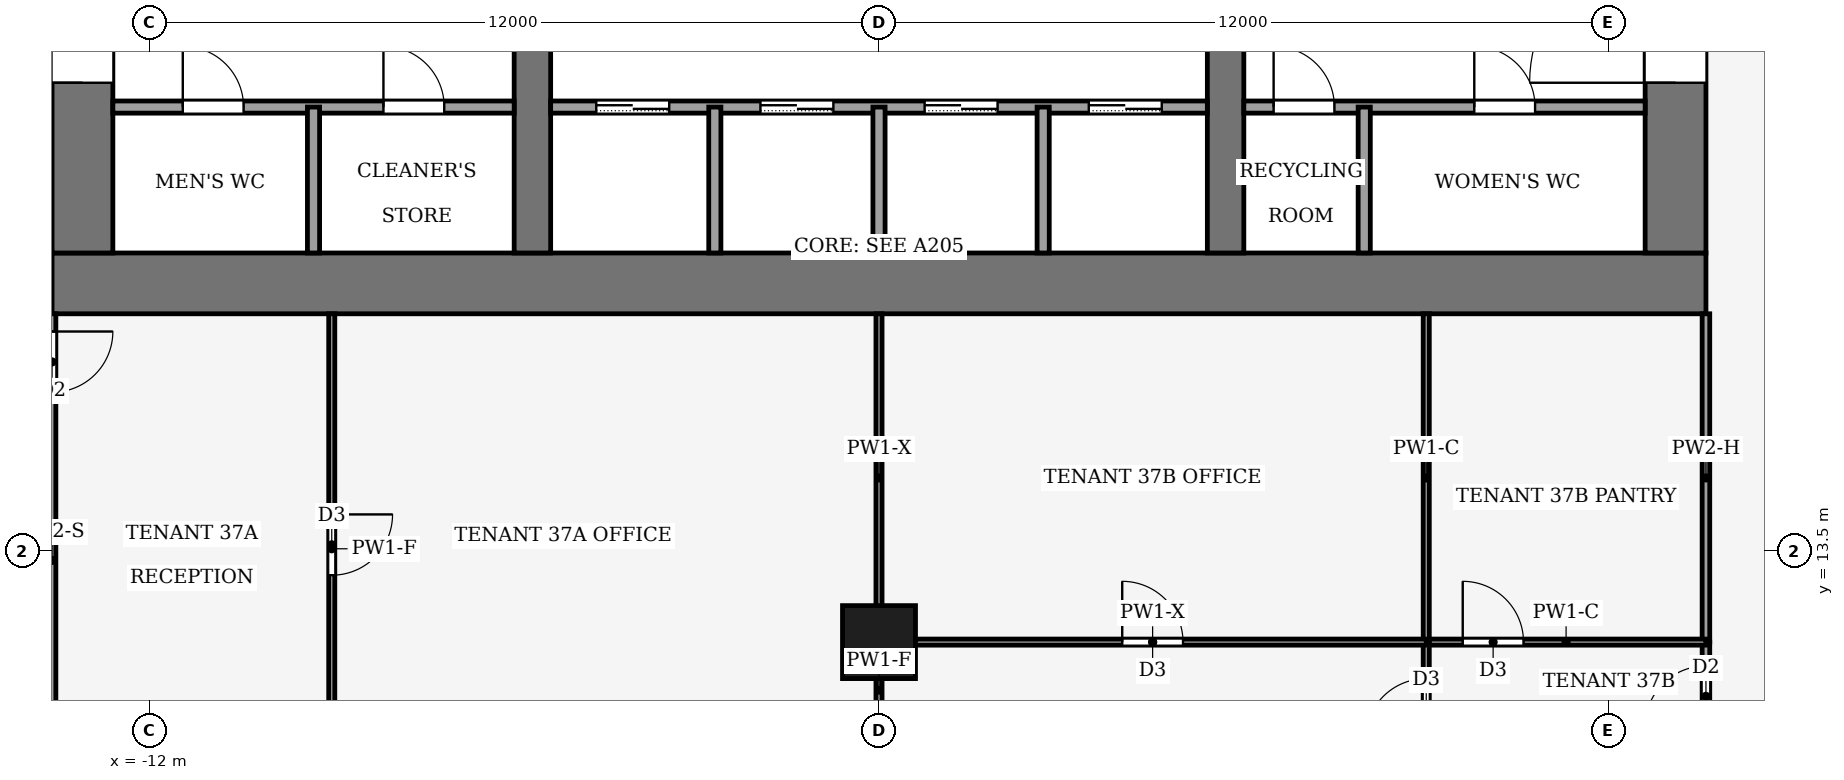
"""IFC4 building model, lengths in metres.
Left out: names, types, materials, properties, quantities, classifications, styles, units other than length and angle.
Written with IfcOpenShell. Run it as: python <this file> out.ifc"""

import sys

from ifc_helpers import new_model, si_unit, direction, frame, frame_2d, origin, origin_2d, place, context, subcontext, project, spatial, rectangle, hollow_rectangle, extrude, element, fill, save


model = new_model("IFC4")
c1 = context("Model", 3, precision=1e-05, world=origin(), true_north=direction((0.0, 1.0)))
c2 = subcontext(c1, "Body", "Model", "MODEL_VIEW")
j1 = project(units=[si_unit("LENGTHUNIT", "METRE"), si_unit("PLANEANGLEUNIT", "RADIAN")], contexts=[c1])
p1 = place(None, origin())
s1 = spatial("IfcSite", under=j1, at=p1, CompositionType="ELEMENT")
p2 = place(p1, origin())
s2 = spatial("IfcBuilding", under=s1, at=p2, CompositionType="ELEMENT")
p3 = place(p2, frame((0.0, 0.0, 162.0)))
s3 = spatial("IfcBuildingStorey", under=s2, at=p3, CompositionType="ELEMENT", Elevation=162.0)
p4 = place(p3, frame((-13.6, 17.9, -0.13), z_axis=(0.0, 0.0, 1.0), x_axis=(1.0, 0.0, 0.0)))
e1 = element("IfcWall", 1, at=p4, inside=s3, PredefinedType="SHEAR", context=c2, shape_type="SweptSolid", body=[
    extrude(rectangle(XDim=27.2, YDim=1.0, at=frame_2d((13.6, 0.0))), origin(), (0.0, 0.0, 1.0), 4.0),
])
p5 = place(p3, frame((-13.1, 18.4, -0.13), z_axis=(0.0, 0.0, 1.0), x_axis=(0.0, 1.0, 0.0)))
e2 = element("IfcWall", 2, at=p5, inside=s3, PredefinedType="SHEAR", context=c2, shape_type="SweptSolid", body=[
    extrude(rectangle(XDim=19.2, YDim=1.0, at=frame_2d((9.6, 0.0))), origin(), (0.0, 0.0, 1.0), 4.0),
])
p6 = place(p5, frame((2.8, 0.0, 0.13)))
e3 = element("IfcOpeningElement", 3, at=p6, cuts=e2, PredefinedType="OPENING", context=c2, shape_type="SweptSolid", body=[
    extrude(rectangle(XDim=2.4, YDim=2.4, at=frame_2d((1.2, 1.2))), frame((0.0, 0.51, 0.0), z_axis=(0.0, -1.0, 0.0), x_axis=(1.0, 0.0, 0.0)), (0.0, 0.0, 1.0), 1.02),
])
p7 = place(p5, frame((13.4, 0.0, 0.13)))
e4 = element("IfcOpeningElement", 4, at=p7, cuts=e2, PredefinedType="OPENING", context=c2, shape_type="SweptSolid", body=[
    extrude(rectangle(XDim=1.4, YDim=2.2, at=frame_2d((0.7, 1.1))), frame((0.0, 0.51, 0.0), z_axis=(0.0, -1.0, 0.0), x_axis=(1.0, 0.0, 0.0)), (0.0, 0.0, 1.0), 1.02),
])
p8 = place(p3, frame((13.1, 18.4, -0.13), z_axis=(0.0, 0.0, 1.0), x_axis=(0.0, 1.0, 0.0)))
e5 = element("IfcWall", 5, at=p8, inside=s3, PredefinedType="SHEAR", context=c2, shape_type="SweptSolid", body=[
    extrude(rectangle(XDim=19.2, YDim=1.0, at=frame_2d((9.6, 0.0))), origin(), (0.0, 0.0, 1.0), 4.0),
])
p9 = place(p8, frame((2.8, 0.0, 0.13)))
e6 = element("IfcOpeningElement", 6, at=p9, cuts=e5, PredefinedType="OPENING", context=c2, shape_type="SweptSolid", body=[
    extrude(rectangle(XDim=2.4, YDim=2.4, at=frame_2d((1.2, 1.2))), frame((0.0, 0.51, 0.0), z_axis=(0.0, -1.0, 0.0), x_axis=(1.0, 0.0, 0.0)), (0.0, 0.0, 1.0), 1.02),
])
p10 = place(p8, frame((13.3, 0.0, 0.13)))
e7 = element("IfcOpeningElement", 7, at=p10, cuts=e5, PredefinedType="OPENING", context=c2, shape_type="SweptSolid", body=[
    extrude(rectangle(XDim=2.4, YDim=2.4, at=frame_2d((1.2, 1.2))), frame((0.0, 0.51, 0.0), z_axis=(0.0, -1.0, 0.0), x_axis=(1.0, 0.0, 0.0)), (0.0, 0.0, 1.0), 1.02),
])
p11 = place(p3, frame((-5.7, 18.4, -0.13), z_axis=(0.0, 0.0, 1.0), x_axis=(0.0, 1.0, 0.0)))
e8 = element("IfcWall", 8, at=p11, inside=s3, PredefinedType="SHEAR", context=c2, shape_type="SweptSolid", body=[
    extrude(rectangle(XDim=19.2, YDim=0.6, at=frame_2d((9.6, 0.0))), origin(), (0.0, 0.0, 1.0), 4.0),
])
p12 = place(p11, frame((8.35, 0.0, 0.13)))
e9 = element("IfcOpeningElement", 9, at=p12, cuts=e8, PredefinedType="OPENING", context=c2, shape_type="SweptSolid", body=[
    extrude(rectangle(XDim=0.9, YDim=2.1, at=frame_2d((0.45, 1.05))), frame((0.0, 0.31, 0.0), z_axis=(0.0, -1.0, 0.0), x_axis=(1.0, 0.0, 0.0)), (0.0, 0.0, 1.0), 0.62),
])
p13 = place(p3, frame((5.7, 18.4, -0.13), z_axis=(0.0, 0.0, 1.0), x_axis=(0.0, 1.0, 0.0)))
e10 = element("IfcWall", 10, at=p13, inside=s3, PredefinedType="SHEAR", context=c2, shape_type="SweptSolid", body=[
    extrude(rectangle(XDim=19.2, YDim=0.6, at=frame_2d((9.6, 0.0))), origin(), (0.0, 0.0, 1.0), 4.0),
])
p14 = place(p13, frame((8.35, 0.0, 0.13)))
e11 = element("IfcOpeningElement", 11, at=p14, cuts=e10, PredefinedType="OPENING", context=c2, shape_type="SweptSolid", body=[
    extrude(rectangle(XDim=0.9, YDim=2.1, at=frame_2d((0.45, 1.05))), frame((0.0, 0.31, 0.0), z_axis=(0.0, -1.0, 0.0), x_axis=(1.0, 0.0, 0.0)), (0.0, 0.0, 1.0), 0.62),
])
p15 = place(p13, frame((13.3, 0.0, 0.13)))
e12 = element("IfcOpeningElement", 12, at=p15, cuts=e10, PredefinedType="OPENING", context=c2, shape_type="SweptSolid", body=[
    extrude(rectangle(XDim=2.4, YDim=2.4, at=frame_2d((1.2, 1.2))), frame((0.0, 0.31, 0.0), z_axis=(0.0, -1.0, 0.0), x_axis=(1.0, 0.0, 0.0)), (0.0, 0.0, 1.0), 0.62),
])
p16 = place(p3, frame((0.0, 12.0, 0.0), z_axis=(0.0, 0.0, 1.0), x_axis=(1.0, 0.0, 0.0)))
e13 = element("IfcColumn", 13, at=p16, inside=s3, PredefinedType="COLUMN", context=c2, shape_type="SweptSolid", body=[
    extrude(hollow_rectangle(XDim=1.2, YDim=1.2, WallThickness=0.07, at=origin_2d()), origin(), (0.0, 0.0, 1.0), 4.0),
])
p17 = place(p3, frame((-12.6, 20.8, 0.0), z_axis=(0.0, 0.0, 1.0), x_axis=(1.0, 0.0, 0.0)))
e14 = element("IfcWall", 14, at=p17, inside=s3, PredefinedType="PARTITIONING", context=c2, shape_type="SweptSolid", body=[
    extrude(rectangle(XDim=6.6, YDim=0.2, at=frame_2d((3.3, 0.0))), origin(), (0.0, 0.0, 1.0), 3.87),
])
p18 = place(p17, frame((1.15, 0.0, 0.0)))
e15 = element("IfcOpeningElement", 15, at=p18, cuts=e14, PredefinedType="OPENING", context=c2, shape_type="SweptSolid", body=[
    extrude(rectangle(XDim=1.0, YDim=2.1, at=frame_2d((0.5, 1.05))), frame((0.0, 0.11, 0.0), z_axis=(0.0, -1.0, 0.0), x_axis=(1.0, 0.0, 0.0)), (0.0, 0.0, 1.0), 0.22),
])
p19 = place(p17, frame((4.45, 0.0, 0.0)))
e16 = element("IfcOpeningElement", 16, at=p19, cuts=e14, PredefinedType="OPENING", context=c2, shape_type="SweptSolid", body=[
    extrude(rectangle(XDim=1.0, YDim=2.1, at=frame_2d((0.5, 1.05))), frame((0.0, 0.11, 0.0), z_axis=(0.0, -1.0, 0.0), x_axis=(1.0, 0.0, 0.0)), (0.0, 0.0, 1.0), 0.22),
])
p20 = place(p3, frame((-5.4, 20.8, 0.0), z_axis=(0.0, 0.0, 1.0), x_axis=(1.0, 0.0, 0.0)))
e17 = element("IfcWall", 17, at=p20, inside=s3, PredefinedType="PARTITIONING", context=c2, shape_type="SweptSolid", body=[
    extrude(rectangle(XDim=10.8, YDim=0.2, at=frame_2d((5.4, 0.0))), origin(), (0.0, 0.0, 1.0), 3.87),
])
p21 = place(p20, frame((0.75, 0.0, 0.0)))
e18 = element("IfcOpeningElement", 18, at=p21, cuts=e17, PredefinedType="OPENING", context=c2, shape_type="SweptSolid", body=[
    extrude(rectangle(XDim=1.2, YDim=2.2, at=frame_2d((0.6, 1.1))), frame((0.0, 0.11, 0.0), z_axis=(0.0, -1.0, 0.0), x_axis=(1.0, 0.0, 0.0)), (0.0, 0.0, 1.0), 0.22),
])
p22 = place(p20, frame((3.45, 0.0, 0.0)))
e19 = element("IfcOpeningElement", 19, at=p22, cuts=e17, PredefinedType="OPENING", context=c2, shape_type="SweptSolid", body=[
    extrude(rectangle(XDim=1.2, YDim=2.2, at=frame_2d((0.6, 1.1))), frame((0.0, 0.11, 0.0), z_axis=(0.0, -1.0, 0.0), x_axis=(1.0, 0.0, 0.0)), (0.0, 0.0, 1.0), 0.22),
])
p23 = place(p20, frame((6.15, 0.0, 0.0)))
e20 = element("IfcOpeningElement", 20, at=p23, cuts=e17, PredefinedType="OPENING", context=c2, shape_type="SweptSolid", body=[
    extrude(rectangle(XDim=1.2, YDim=2.2, at=frame_2d((0.6, 1.1))), frame((0.0, 0.11, 0.0), z_axis=(0.0, -1.0, 0.0), x_axis=(1.0, 0.0, 0.0)), (0.0, 0.0, 1.0), 0.22),
])
p24 = place(p20, frame((8.85, 0.0, 0.0)))
e21 = element("IfcOpeningElement", 21, at=p24, cuts=e17, PredefinedType="OPENING", context=c2, shape_type="SweptSolid", body=[
    extrude(rectangle(XDim=1.2, YDim=2.2, at=frame_2d((0.6, 1.1))), frame((0.0, 0.11, 0.0), z_axis=(0.0, -1.0, 0.0), x_axis=(1.0, 0.0, 0.0)), (0.0, 0.0, 1.0), 0.22),
])
p25 = place(p3, frame((6.0, 20.8, 0.0), z_axis=(0.0, 0.0, 1.0), x_axis=(1.0, 0.0, 0.0)))
e22 = element("IfcWall", 22, at=p25, inside=s3, PredefinedType="PARTITIONING", context=c2, shape_type="SweptSolid", body=[
    extrude(rectangle(XDim=6.6, YDim=0.2, at=frame_2d((3.3, 0.0))), origin(), (0.0, 0.0, 1.0), 3.87),
])
p26 = place(p25, frame((0.49, 0.0, 0.0)))
e23 = element("IfcOpeningElement", 23, at=p26, cuts=e22, PredefinedType="OPENING", context=c2, shape_type="SweptSolid", body=[
    extrude(rectangle(XDim=1.0, YDim=2.1, at=frame_2d((0.5, 1.05))), frame((0.0, 0.11, 0.0), z_axis=(0.0, -1.0, 0.0), x_axis=(1.0, 0.0, 0.0)), (0.0, 0.0, 1.0), 0.22),
])
p27 = place(p25, frame((3.79, 0.0, 0.0)))
e24 = element("IfcOpeningElement", 24, at=p27, cuts=e22, PredefinedType="OPENING", context=c2, shape_type="SweptSolid", body=[
    extrude(rectangle(XDim=1.0, YDim=2.1, at=frame_2d((0.5, 1.05))), frame((0.0, 0.11, 0.0), z_axis=(0.0, -1.0, 0.0), x_axis=(1.0, 0.0, 0.0)), (0.0, 0.0, 1.0), 0.22),
])
for number, where, z_axis, x_axis in (
    (25, (-9.3, 18.4, 0.0), (0.0, 0.0, 1.0), (0.0, 1.0, 0.0)),
    (26, (-2.7, 18.4, 0.0), (0.0, 0.0, 1.0), (0.0, 1.0, 0.0)),
    (27, (0.0, 18.4, 0.0), (0.0, 0.0, 1.0), (0.0, 1.0, 0.0)),
    (28, (2.7, 18.4, 0.0), (0.0, 0.0, 1.0), (0.0, 1.0, 0.0)),
    (29, (7.98, 18.4, 0.0), (0.0, 0.0, 1.0), (0.0, 1.0, 0.0)),
):
    element("IfcWall", number, at=place(p3, frame(where, z_axis=z_axis, x_axis=x_axis)), inside=s3, PredefinedType="PARTITIONING", context=c2, shape_type="SweptSolid", body=[
        extrude(rectangle(XDim=2.4, YDim=0.2, at=frame_2d((1.2, 0.0))), origin(), (0.0, 0.0, 1.0), 3.87),
    ])
p28 = place(p3, frame((-13.6, 17.4, 0.0), z_axis=(0.0, 0.0, 1.0), x_axis=(0.0, -1.0, 0.0)))
e30 = element("IfcWall", 30, at=p28, inside=s3, PredefinedType="PARTITIONING", context=c2, shape_type="SweptSolid", body=[
    extrude(rectangle(XDim=8.113, YDim=0.125, at=frame_2d((4.057, 0.0))), origin(), (0.0, 0.0, 1.0), 3.04),
])
p29 = place(p28, frame((0.292, 0.0, 0.0)))
e31 = element("IfcOpeningElement", 31, at=p29, cuts=e30, PredefinedType="OPENING", context=c2, shape_type="SweptSolid", body=[
    extrude(rectangle(XDim=1.0, YDim=2.1, at=frame_2d((0.5, 1.05))), frame((0.0, 0.073, 0.0), z_axis=(0.0, -1.0, 0.0), x_axis=(1.0, 0.0, 0.0)), (0.0, 0.0, 1.0), 0.145),
])
p30 = place(p3, frame((13.6, 9.287, 0.0), z_axis=(0.0, 0.0, 1.0), x_axis=(0.0, 1.0, 0.0)))
e32 = element("IfcWall", 32, at=p30, inside=s3, PredefinedType="PARTITIONING", context=c2, shape_type="SweptSolid", body=[
    extrude(rectangle(XDim=2.713, YDim=0.125, at=frame_2d((1.357, 0.0))), origin(), (0.0, 0.0, 1.0), 3.04),
])
p31 = place(p30, frame((1.322, 0.0, 0.0)))
e33 = element("IfcOpeningElement", 33, at=p31, cuts=e32, PredefinedType="OPENING", context=c2, shape_type="SweptSolid", body=[
    extrude(rectangle(XDim=1.0, YDim=2.1, at=frame_2d((0.5, 1.05))), frame((0.0, 0.073, 0.0), z_axis=(0.0, -1.0, 0.0), x_axis=(1.0, 0.0, 0.0)), (0.0, 0.0, 1.0), 0.145),
])
p32 = place(p3, frame((13.6, 12.0, 0.0), z_axis=(0.0, 0.0, 1.0), x_axis=(0.0, 1.0, 0.0)))
e34 = element("IfcWall", 34, at=p32, inside=s3, PredefinedType="PARTITIONING", context=c2, shape_type="SweptSolid", body=[
    extrude(rectangle(XDim=5.4, YDim=0.125, at=frame_2d((2.7, 0.0))), origin(), (0.0, 0.0, 1.0), 3.14),
])
p33 = place(p3, frame((-9.0, 17.4, 0.0), z_axis=(0.0, 0.0, 1.0), x_axis=(0.0, -1.0, 0.0)))
e35 = element("IfcWall", 35, at=p33, inside=s3, PredefinedType="PARTITIONING", context=c2, shape_type="SweptSolid", body=[
    extrude(rectangle(XDim=7.73, YDim=0.1, at=frame_2d((3.865, 0.0))), origin(), (0.0, 0.0, 1.0), 3.04),
])
p34 = place(p33, frame((3.3, 0.0, 0.0)))
e36 = element("IfcOpeningElement", 36, at=p34, cuts=e35, PredefinedType="OPENING", context=c2, shape_type="SweptSolid", body=[
    extrude(rectangle(XDim=1.0, YDim=2.1, at=frame_2d((0.5, 1.05))), frame((0.0, 0.06, 0.0), z_axis=(0.0, -1.0, 0.0), x_axis=(1.0, 0.0, 0.0)), (0.0, 0.0, 1.0), 0.12),
])
p35 = place(p3, frame((0.0, 10.42, 0.0), z_axis=(0.0, 0.0, 1.0), x_axis=(0.0, 1.0, 0.0)))
e37 = element("IfcWall", 37, at=p35, inside=s3, PredefinedType="PARTITIONING", context=c2, shape_type="SweptSolid", body=[
    extrude(rectangle(XDim=1.58, YDim=0.1, at=frame_2d((0.79, 0.0))), origin(), (0.0, 0.0, 1.0), 3.04),
])
p36 = place(p3, frame((0.0, 12.0, 0.0), z_axis=(0.0, 0.0, 1.0), x_axis=(0.0, 1.0, 0.0)))
e38 = element("IfcWall", 38, at=p36, inside=s3, PredefinedType="PARTITIONING", context=c2, shape_type="SweptSolid", body=[
    extrude(rectangle(XDim=5.4, YDim=0.1, at=frame_2d((2.7, 0.0))), origin(), (0.0, 0.0, 1.0), 3.54),
])
p37 = place(p3, frame((9.0, 12.0, 0.0), z_axis=(0.0, 0.0, 1.0), x_axis=(1.0, 0.0, 0.0)))
e39 = element("IfcWall", 39, at=p37, inside=s3, PredefinedType="PARTITIONING", context=c2, shape_type="SweptSolid", body=[
    extrude(rectangle(XDim=4.6, YDim=0.1, at=frame_2d((2.3, 0.0))), origin(), (0.0, 0.0, 1.0), 3.87),
])
p38 = place(p37, frame((0.6, 0.0, 0.0)))
e40 = element("IfcOpeningElement", 40, at=p38, cuts=e39, PredefinedType="OPENING", context=c2, shape_type="SweptSolid", body=[
    extrude(rectangle(XDim=1.0, YDim=2.1, at=frame_2d((0.5, 1.05))), frame((0.0, 0.06, 0.0), z_axis=(0.0, -1.0, 0.0), x_axis=(1.0, 0.0, 0.0)), (0.0, 0.0, 1.0), 0.12),
])
p39 = place(p3, frame((9.0, 9.67, 0.0), z_axis=(0.0, 0.0, 1.0), x_axis=(0.0, 1.0, 0.0)))
e41 = element("IfcWall", 41, at=p39, inside=s3, PredefinedType="PARTITIONING", context=c2, shape_type="SweptSolid", body=[
    extrude(rectangle(XDim=2.33, YDim=0.1, at=frame_2d((1.165, 0.0))), origin(), (0.0, 0.0, 1.0), 3.04),
])
p40 = place(p39, frame((0.73, 0.0, 0.0)))
e42 = element("IfcOpeningElement", 42, at=p40, cuts=e41, PredefinedType="OPENING", context=c2, shape_type="SweptSolid", body=[
    extrude(rectangle(XDim=1.0, YDim=2.1, at=frame_2d((0.5, 1.05))), frame((0.0, 0.06, 0.0), z_axis=(0.0, -1.0, 0.0), x_axis=(1.0, 0.0, 0.0)), (0.0, 0.0, 1.0), 0.12),
])
p41 = place(p3, frame((9.0, 17.4, 0.0), z_axis=(0.0, 0.0, 1.0), x_axis=(0.0, -1.0, 0.0)))
e43 = element("IfcWall", 43, at=p41, inside=s3, PredefinedType="PARTITIONING", context=c2, shape_type="SweptSolid", body=[
    extrude(rectangle(XDim=5.4, YDim=0.1, at=frame_2d((2.7, 0.0))), origin(), (0.0, 0.0, 1.0), 3.87),
])
p42 = place(p3, frame((0.0, 12.0, 0.0), z_axis=(0.0, 0.0, 1.0), x_axis=(1.0, 0.0, 0.0)))
e44 = element("IfcWall", 44, at=p42, inside=s3, PredefinedType="PARTITIONING", context=c2, shape_type="SweptSolid", body=[
    extrude(rectangle(XDim=9.0, YDim=0.1, at=frame_2d((4.5, 0.0))), origin(), (0.0, 0.0, 1.0), 3.54),
])
p43 = place(p42, frame((4.0, 0.0, 0.0)))
e45 = element("IfcOpeningElement", 45, at=p43, cuts=e44, PredefinedType="OPENING", context=c2, shape_type="SweptSolid", body=[
    extrude(rectangle(XDim=1.0, YDim=2.1, at=frame_2d((0.5, 1.05))), frame((0.0, 0.06, 0.0), z_axis=(0.0, -1.0, 0.0), x_axis=(1.0, 0.0, 0.0)), (0.0, 0.0, 1.0), 0.12),
])
p44 = place(p21, origin())
e46 = element("IfcDoor", 46, at=p44, inside=s3, OperationType="SLIDING_TO_LEFT", PredefinedType="DOOR", context=c2, shape_type="SweptSolid", body=[
    extrude(rectangle(XDim=1.2, YDim=2.2, at=frame_2d((0.6, 1.1))), frame((0.0, 0.025, 0.0), z_axis=(0.0, -1.0, 0.0), x_axis=(1.0, 0.0, 0.0)), (0.0, 0.0, 1.0), 0.05),
])
fill(e18, e46)
p45 = place(p22, origin())
e47 = element("IfcDoor", 47, at=p45, inside=s3, OperationType="SLIDING_TO_LEFT", PredefinedType="DOOR", context=c2, shape_type="SweptSolid", body=[
    extrude(rectangle(XDim=1.2, YDim=2.2, at=frame_2d((0.6, 1.1))), frame((0.0, 0.025, 0.0), z_axis=(0.0, -1.0, 0.0), x_axis=(1.0, 0.0, 0.0)), (0.0, 0.0, 1.0), 0.05),
])
fill(e19, e47)
p46 = place(p23, origin())
e48 = element("IfcDoor", 48, at=p46, inside=s3, OperationType="SLIDING_TO_LEFT", PredefinedType="DOOR", context=c2, shape_type="SweptSolid", body=[
    extrude(rectangle(XDim=1.2, YDim=2.2, at=frame_2d((0.6, 1.1))), frame((0.0, 0.025, 0.0), z_axis=(0.0, -1.0, 0.0), x_axis=(1.0, 0.0, 0.0)), (0.0, 0.0, 1.0), 0.05),
])
fill(e20, e48)
p47 = place(p24, origin())
e49 = element("IfcDoor", 49, at=p47, inside=s3, OperationType="SLIDING_TO_LEFT", PredefinedType="DOOR", context=c2, shape_type="SweptSolid", body=[
    extrude(rectangle(XDim=1.2, YDim=2.2, at=frame_2d((0.6, 1.1))), frame((0.0, 0.025, 0.0), z_axis=(0.0, -1.0, 0.0), x_axis=(1.0, 0.0, 0.0)), (0.0, 0.0, 1.0), 0.05),
])
fill(e21, e49)
p48 = place(p18, origin())
e50 = element("IfcDoor", 50, at=p48, inside=s3, OperationType="SINGLE_SWING_LEFT", PredefinedType="DOOR", context=c2, shape_type="SweptSolid", body=[
    extrude(rectangle(XDim=1.0, YDim=2.1, at=frame_2d((0.5, 1.05))), frame((0.0, 0.025, 0.0), z_axis=(0.0, -1.0, 0.0), x_axis=(1.0, 0.0, 0.0)), (0.0, 0.0, 1.0), 0.05),
])
fill(e15, e50)
p49 = place(p19, origin())
e51 = element("IfcDoor", 51, at=p49, inside=s3, OperationType="SINGLE_SWING_LEFT", PredefinedType="DOOR", context=c2, shape_type="SweptSolid", body=[
    extrude(rectangle(XDim=1.0, YDim=2.1, at=frame_2d((0.5, 1.05))), frame((0.0, 0.025, 0.0), z_axis=(0.0, -1.0, 0.0), x_axis=(1.0, 0.0, 0.0)), (0.0, 0.0, 1.0), 0.05),
])
fill(e16, e51)
p50 = place(p26, origin())
e52 = element("IfcDoor", 52, at=p50, inside=s3, OperationType="SINGLE_SWING_RIGHT", PredefinedType="DOOR", context=c2, shape_type="SweptSolid", body=[
    extrude(rectangle(XDim=1.0, YDim=2.1, at=frame_2d((0.5, 1.05))), frame((0.0, 0.025, 0.0), z_axis=(0.0, -1.0, 0.0), x_axis=(1.0, 0.0, 0.0)), (0.0, 0.0, 1.0), 0.05),
])
fill(e23, e52)
p51 = place(p27, origin())
e53 = element("IfcDoor", 53, at=p51, inside=s3, OperationType="SINGLE_SWING_RIGHT", PredefinedType="DOOR", context=c2, shape_type="SweptSolid", body=[
    extrude(rectangle(XDim=1.0, YDim=2.1, at=frame_2d((0.5, 1.05))), frame((0.0, 0.025, 0.0), z_axis=(0.0, -1.0, 0.0), x_axis=(1.0, 0.0, 0.0)), (0.0, 0.0, 1.0), 0.05),
])
fill(e24, e53)
p52 = place(p6, origin())
e54 = element("IfcDoor", 54, at=p52, inside=s3, OperationType="DOUBLE_DOOR_SINGLE_SWING", PredefinedType="DOOR", context=c2, shape_type="SweptSolid", body=[
    extrude(rectangle(XDim=2.4, YDim=2.4, at=frame_2d((1.2, 1.2))), frame((0.0, 0.025, 0.0), z_axis=(0.0, -1.0, 0.0), x_axis=(1.0, 0.0, 0.0)), (0.0, 0.0, 1.0), 0.05),
])
fill(e3, e54)
p53 = place(p9, origin())
e55 = element("IfcDoor", 55, at=p53, inside=s3, OperationType="DOUBLE_DOOR_SINGLE_SWING", PredefinedType="DOOR", context=c2, shape_type="SweptSolid", body=[
    extrude(rectangle(XDim=2.4, YDim=2.4, at=frame_2d((1.2, 1.2))), frame((0.0, 0.025, 0.0), z_axis=(0.0, -1.0, 0.0), x_axis=(1.0, 0.0, 0.0)), (0.0, 0.0, 1.0), 0.05),
])
fill(e6, e55)
p54 = place(p29, origin())
e56 = element("IfcDoor", 56, at=p54, inside=s3, OperationType="SINGLE_SWING_LEFT", PredefinedType="DOOR", context=c2, shape_type="SweptSolid", body=[
    extrude(rectangle(XDim=1.0, YDim=2.1, at=frame_2d((0.5, 1.05))), frame((0.0, 0.025, 0.0), z_axis=(0.0, -1.0, 0.0), x_axis=(1.0, 0.0, 0.0)), (0.0, 0.0, 1.0), 0.05),
])
fill(e31, e56)
p55 = place(p31, origin())
e57 = element("IfcDoor", 57, at=p55, inside=s3, OperationType="SINGLE_SWING_RIGHT", PredefinedType="DOOR", context=c2, shape_type="SweptSolid", body=[
    extrude(rectangle(XDim=1.0, YDim=2.1, at=frame_2d((0.5, 1.05))), frame((0.0, 0.025, 0.0), z_axis=(0.0, -1.0, 0.0), x_axis=(1.0, 0.0, 0.0)), (0.0, 0.0, 1.0), 0.05),
])
fill(e33, e57)
p56 = place(p34, origin())
e58 = element("IfcDoor", 58, at=p56, inside=s3, OperationType="SINGLE_SWING_LEFT", PredefinedType="DOOR", context=c2, shape_type="SweptSolid", body=[
    extrude(rectangle(XDim=1.0, YDim=2.1, at=frame_2d((0.5, 1.05))), frame((0.0, 0.025, 0.0), z_axis=(0.0, -1.0, 0.0), x_axis=(1.0, 0.0, 0.0)), (0.0, 0.0, 1.0), 0.05),
])
fill(e36, e58)
p57 = place(p38, origin())
e59 = element("IfcDoor", 59, at=p57, inside=s3, OperationType="SINGLE_SWING_LEFT", PredefinedType="DOOR", context=c2, shape_type="SweptSolid", body=[
    extrude(rectangle(XDim=1.0, YDim=2.1, at=frame_2d((0.5, 1.05))), frame((0.0, 0.025, 0.0), z_axis=(0.0, -1.0, 0.0), x_axis=(1.0, 0.0, 0.0)), (0.0, 0.0, 1.0), 0.05),
])
fill(e40, e59)
p58 = place(p40, origin())
e60 = element("IfcDoor", 60, at=p58, inside=s3, OperationType="SINGLE_SWING_RIGHT", PredefinedType="DOOR", context=c2, shape_type="SweptSolid", body=[
    extrude(rectangle(XDim=1.0, YDim=2.1, at=frame_2d((0.5, 1.05))), frame((0.0, 0.025, 0.0), z_axis=(0.0, -1.0, 0.0), x_axis=(1.0, 0.0, 0.0)), (0.0, 0.0, 1.0), 0.05),
])
fill(e42, e60)
p59 = place(p43, origin())
e61 = element("IfcDoor", 61, at=p59, inside=s3, OperationType="SINGLE_SWING_RIGHT", PredefinedType="DOOR", context=c2, shape_type="SweptSolid", body=[
    extrude(rectangle(XDim=1.0, YDim=2.1, at=frame_2d((0.5, 1.05))), frame((0.0, 0.025, 0.0), z_axis=(0.0, -1.0, 0.0), x_axis=(1.0, 0.0, 0.0)), (0.0, 0.0, 1.0), 0.05),
])
fill(e45, e61)
save(model, sys.argv[1])
